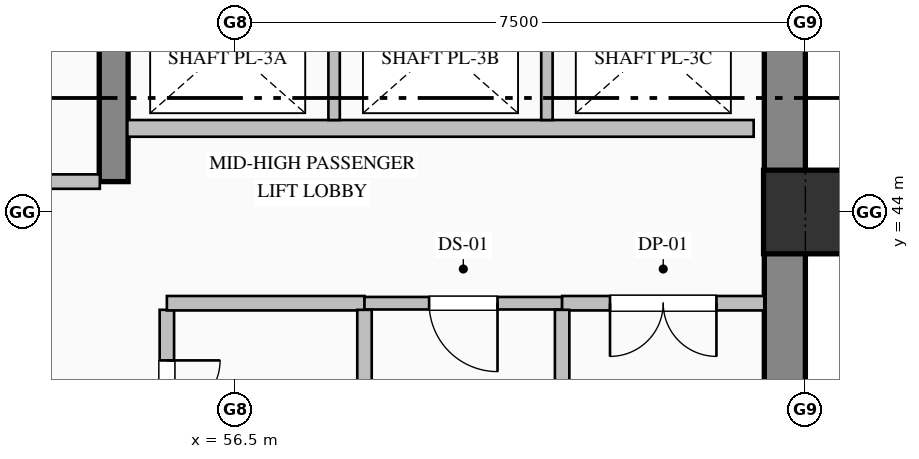
"""IFC4 building model, lengths in metres.
Left out: names, types, materials, properties, quantities, classifications, styles, units other than length and angle.
Written with IfcOpenShell. Run it as: python <this file> out.ifc"""

import sys

from ifc_helpers import new_model, si_unit, direction, frame, frame_2d, origin, origin_2d, place, context, subcontext, project, spatial, rectangle, hollow_rectangle, extrude, element, fill, save


model = new_model("IFC4")
c1 = context("Model", 3, precision=1e-05, world=origin(), true_north=direction((0.0, 1.0)))
c2 = subcontext(c1, "Body", "Model", "MODEL_VIEW")
j1 = project(units=[si_unit("LENGTHUNIT", "METRE"), si_unit("PLANEANGLEUNIT", "RADIAN")], contexts=[c1])
p1 = place(None, origin())
s1 = spatial("IfcSite", under=j1, at=p1, CompositionType="ELEMENT")
p2 = place(p1, origin())
s2 = spatial("IfcBuilding", under=s1, at=p2, CompositionType="ELEMENT")
p3 = place(p2, frame((0.0, 0.0, 76.2)))
s3 = spatial("IfcBuildingStorey", under=s2, at=p3, CompositionType="ELEMENT", Elevation=76.2)
p4 = place(p3, frame((63.73, 36.32, 0.0), z_axis=(0.0, 0.0, 1.0), x_axis=(0.0, 1.0, 0.0)))
e1 = element("IfcWall", 1, at=p4, inside=s3, PredefinedType="SHEAR", context=c2, shape_type="SweptSolid", body=[
    extrude(rectangle(XDim=15.14, YDim=0.54, at=frame_2d((7.57, 0.0))), origin(), (0.0, 0.0, 1.0), 3.75),
])
p5 = place(p3, frame((54.9, 44.4, 0.0), z_axis=(0.0, 0.0, 1.0), x_axis=(0.0, 1.0, 0.0)))
e2 = element("IfcWall", 2, at=p5, inside=s3, PredefinedType="SHEAR", context=c2, shape_type="SweptSolid", body=[
    extrude(rectangle(XDim=7.06, YDim=0.38, at=frame_2d((3.53, 0.0))), origin(), (0.0, 0.0, 1.0), 3.75),
])
p6 = place(p3, frame((64.0, 44.0, 0.0), z_axis=(0.0, 0.0, 1.0), x_axis=(1.0, 0.0, 0.0)))
e3 = element("IfcColumn", 3, at=p6, inside=s3, PredefinedType="COLUMN", context=c2, shape_type="SweptSolid", body=[
    extrude(hollow_rectangle(XDim=1.1, YDim=1.1, WallThickness=0.04, at=origin_2d()), origin(), (0.0, 0.0, 1.0), 4.0),
])
p7 = place(p3, frame((63.32, 45.1, 0.0), z_axis=(0.0, 0.0, 1.0), x_axis=(-1.0, 0.0, 0.0)))
e4 = element("IfcWall", 4, at=p7, inside=s3, PredefinedType="PARTITIONING", context=c2, shape_type="SweptSolid", body=[
    extrude(rectangle(XDim=8.24, YDim=0.22, at=frame_2d((4.12, 0.0))), origin(), (0.0, 0.0, 1.0), 3.75),
])
for number, where, z_axis, x_axis in (
    (5, (57.8, 45.21, 0.0), (0.0, 0.0, 1.0), (0.0, 1.0, 0.0)),
    (6, (60.6, 45.21, 0.0), (0.0, 0.0, 1.0), (0.0, 1.0, 0.0)),
):
    element("IfcWall", number, at=place(p3, frame(where, z_axis=z_axis, x_axis=x_axis)), inside=s3, PredefinedType="PARTITIONING", context=c2, shape_type="SweptSolid", body=[
        extrude(rectangle(XDim=2.03, YDim=0.15, at=frame_2d((1.015, 0.0))), origin(), (0.0, 0.0, 1.0), 3.75),
    ])
p8 = place(p3, frame((54.718, 44.4, 0.0), z_axis=(0.0, 0.0, 1.0), x_axis=(-1.0, 0.0, 0.0)))
e7 = element("IfcWall", 7, at=p8, inside=s3, PredefinedType="PARTITIONING", context=c2, shape_type="SweptSolid", body=[
    extrude(rectangle(XDim=5.136, YDim=0.19, at=frame_2d((2.568, 0.0))), origin(), (0.0, 0.0, 1.0), 3.75),
])
p9 = place(p8, frame((2.043, 0.0, 0.0)))
e8 = element("IfcOpeningElement", 8, at=p9, cuts=e7, PredefinedType="OPENING", context=c2, shape_type="SweptSolid", body=[
    extrude(rectangle(XDim=1.05, YDim=2.15, at=frame_2d((0.525, 1.075))), frame((0.0, 0.105, 0.0), z_axis=(0.0, -1.0, 0.0), x_axis=(1.0, 0.0, 0.0)), (0.0, 0.0, 1.0), 0.21),
])
p10 = place(p3, frame((55.6, 42.713, 0.0), z_axis=(0.0, 0.0, 1.0), x_axis=(0.0, -1.0, 0.0)))
e9 = element("IfcWall", 9, at=p10, inside=s3, PredefinedType="PARTITIONING", context=c2, shape_type="SweptSolid", body=[
    extrude(rectangle(XDim=2.731, YDim=0.19, at=frame_2d((1.365, 0.0))), origin(), (0.0, 0.0, 1.0), 3.75),
])
p11 = place(p10, frame((0.666, 0.0, 0.0)))
e10 = element("IfcOpeningElement", 10, at=p11, cuts=e9, PredefinedType="OPENING", context=c2, shape_type="SweptSolid", body=[
    extrude(rectangle(XDim=1.4, YDim=2.25, at=frame_2d((0.7, 1.125))), frame((0.0, 0.105, 0.0), z_axis=(0.0, -1.0, 0.0), x_axis=(1.0, 0.0, 0.0)), (0.0, 0.0, 1.0), 0.21),
])
p12 = place(p3, frame((58.2, 42.8, 0.0), z_axis=(0.0, 0.0, 1.0), x_axis=(-1.0, 0.0, 0.0)))
e11 = element("IfcWall", 11, at=p12, inside=s3, PredefinedType="PARTITIONING", context=c2, shape_type="SweptSolid", body=[
    extrude(rectangle(XDim=2.6, YDim=0.19, at=frame_2d((1.3, 0.0))), origin(), (0.0, 0.0, 1.0), 3.75),
])
p13 = place(p3, frame((60.8, 42.8, 0.0), z_axis=(0.0, 0.0, 1.0), x_axis=(-1.0, 0.0, 0.0)))
e12 = element("IfcWall", 12, at=p13, inside=s3, PredefinedType="PARTITIONING", context=c2, shape_type="SweptSolid", body=[
    extrude(rectangle(XDim=2.6, YDim=0.165, at=frame_2d((1.3, 0.0))), origin(), (0.0, 0.0, 1.0), 3.75),
])
p14 = place(p13, frame((0.85, 0.0, 0.0)))
e13 = element("IfcOpeningElement", 13, at=p14, cuts=e12, PredefinedType="OPENING", context=c2, shape_type="SweptSolid", body=[
    extrude(rectangle(XDim=0.9, YDim=2.15, at=frame_2d((0.45, 1.075))), frame((0.0, 0.093, 0.0), z_axis=(0.0, -1.0, 0.0), x_axis=(1.0, 0.0, 0.0)), (0.0, 0.0, 1.0), 0.185),
])
p15 = place(p3, frame((63.46, 42.8, 0.0), z_axis=(0.0, 0.0, 1.0), x_axis=(-1.0, 0.0, 0.0)))
e14 = element("IfcWall", 14, at=p15, inside=s3, PredefinedType="PARTITIONING", context=c2, shape_type="SweptSolid", body=[
    extrude(rectangle(XDim=2.66, YDim=0.19, at=frame_2d((1.33, 0.0))), origin(), (0.0, 0.0, 1.0), 3.75),
])
p16 = place(p15, frame((0.63, 0.0, 0.0)))
e15 = element("IfcOpeningElement", 15, at=p16, cuts=e14, PredefinedType="OPENING", context=c2, shape_type="SweptSolid", body=[
    extrude(rectangle(XDim=1.4, YDim=2.25, at=frame_2d((0.7, 1.125))), frame((0.0, 0.105, 0.0), z_axis=(0.0, -1.0, 0.0), x_axis=(1.0, 0.0, 0.0)), (0.0, 0.0, 1.0), 0.21),
])
for number, where, z_axis, x_axis in (
    (16, (58.2, 42.713, 0.0), (0.0, 0.0, 1.0), (0.0, -1.0, 0.0)),
    (17, (60.8, 42.713, 0.0), (0.0, 0.0, 1.0), (0.0, -1.0, 0.0)),
):
    element("IfcWall", number, at=place(p3, frame(where, z_axis=z_axis, x_axis=x_axis)), inside=s3, PredefinedType="PARTITIONING", context=c2, shape_type="SweptSolid", body=[
        extrude(rectangle(XDim=2.731, YDim=0.19, at=frame_2d((1.365, 0.0))), origin(), (0.0, 0.0, 1.0), 3.75),
    ])
p17 = place(p11, origin())
e18 = element("IfcDoor", 18, at=p17, inside=s3, OperationType="DOUBLE_DOOR_SINGLE_SWING", PredefinedType="DOOR", context=c2, shape_type="SweptSolid", body=[
    extrude(rectangle(XDim=1.4, YDim=2.25, at=frame_2d((0.7, 1.125))), frame((0.0, 0.025, 0.0), z_axis=(0.0, -1.0, 0.0), x_axis=(1.0, 0.0, 0.0)), (0.0, 0.0, 1.0), 0.05),
])
fill(e10, e18)
p18 = place(p14, origin())
e19 = element("IfcDoor", 19, at=p18, inside=s3, OperationType="SINGLE_SWING_LEFT", PredefinedType="DOOR", context=c2, shape_type="SweptSolid", body=[
    extrude(rectangle(XDim=0.9, YDim=2.15, at=frame_2d((0.45, 1.075))), frame((0.0, 0.025, 0.0), z_axis=(0.0, -1.0, 0.0), x_axis=(1.0, 0.0, 0.0)), (0.0, 0.0, 1.0), 0.05),
])
fill(e13, e19)
p19 = place(p16, origin())
e20 = element("IfcDoor", 20, at=p19, inside=s3, OperationType="DOUBLE_DOOR_SINGLE_SWING", PredefinedType="DOOR", context=c2, shape_type="SweptSolid", body=[
    extrude(rectangle(XDim=1.4, YDim=2.25, at=frame_2d((0.7, 1.125))), frame((0.0, 0.025, 0.0), z_axis=(0.0, -1.0, 0.0), x_axis=(1.0, 0.0, 0.0)), (0.0, 0.0, 1.0), 0.05),
])
fill(e15, e20)
save(model, sys.argv[1])
